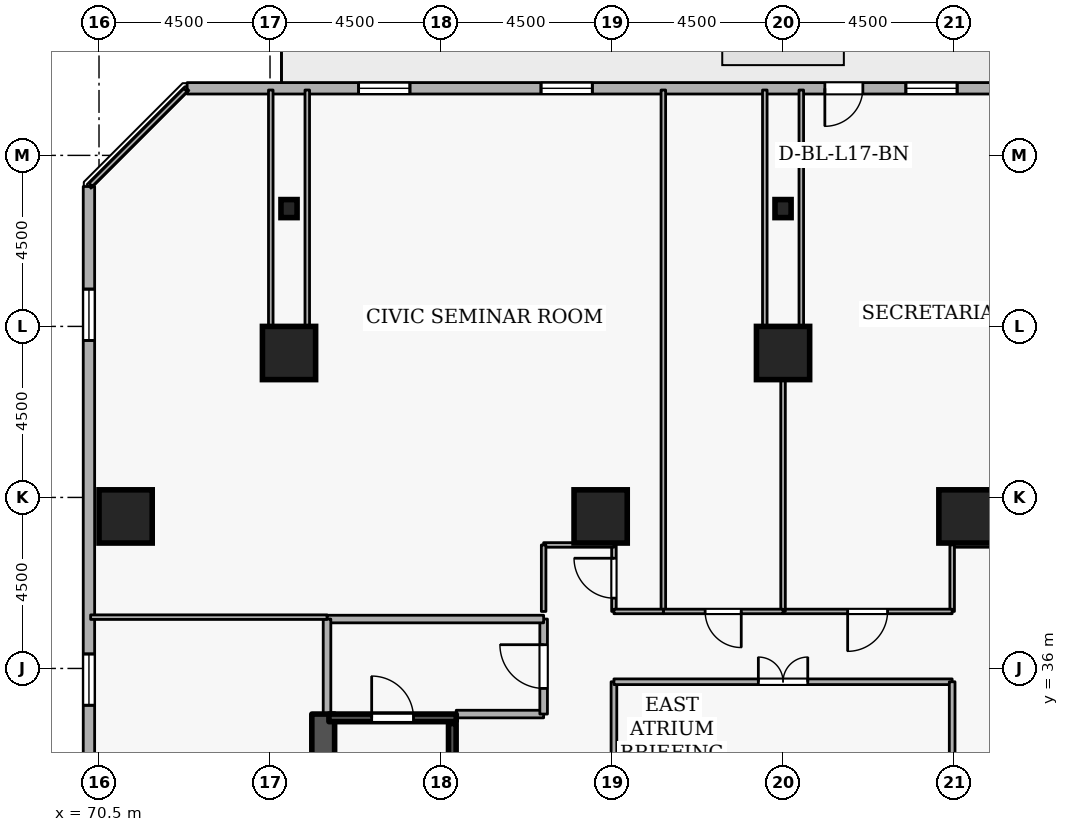
"""IFC4 building model, lengths in metres.
Left out: names, types, materials, properties, quantities, classifications, styles, units other than length and angle.
Written with IfcOpenShell. Run it as: python <this file> out.ifc"""

import sys

from ifc_helpers import new_model, si_unit, direction, frame, frame_2d, origin, origin_2d, place, context, subcontext, project, spatial, rectangle, i_section, extrude, element, fill, save


model = new_model("IFC4")
c1 = context("Model", 3, precision=1e-05, world=origin(), true_north=direction((0.0, 1.0)))
c2 = subcontext(c1, "Body", "Model", "MODEL_VIEW")
j1 = project(units=[si_unit("LENGTHUNIT", "METRE"), si_unit("PLANEANGLEUNIT", "RADIAN")], contexts=[c1])
p1 = place(None, origin())
s1 = spatial("IfcSite", under=j1, at=p1, CompositionType="ELEMENT")
p2 = place(p1, origin())
s2 = spatial("IfcBuilding", under=s1, at=p2, CompositionType="ELEMENT")
p3 = place(p2, frame((0.0, 0.0, 68.1)))
s3 = spatial("IfcBuildingStorey", under=s2, at=p3, CompositionType="ELEMENT", Elevation=68.1)
p4 = place(p3, frame((76.4, 19.2, 0.0), z_axis=(0.0, 0.0, 1.0), x_axis=(0.0, 1.0, 0.0)))
e1 = element("IfcWall", 1, at=p4, inside=s3, PredefinedType="SHEAR", context=c2, shape_type="SweptSolid", body=[
    extrude(rectangle(XDim=15.6, YDim=0.6, at=frame_2d((7.8, 0.0))), origin(), (0.0, 0.0, 1.0), 3.6),
])
for number, where, z_axis, x_axis in (
    (2, (88.5, 44.3, 0.0), (0.0, 0.0, 1.0), (1.0, 0.0, 0.0)),
    (3, (75.5, 44.3, 0.0), (0.0, 0.0, 1.0), (1.0, 0.0, 0.0)),
    (4, (71.2, 40.0, 0.0), (0.0, 0.0, 1.0), (1.0, 0.0, 0.0)),
    (5, (93.3, 40.0, 0.0), (0.0, 0.0, 1.0), (1.0, 0.0, 0.0)),
    (6, (83.7, 40.0, 0.0), (0.0, 0.0, 1.0), (1.0, 0.0, 0.0)),
):
    element("IfcColumn", number, at=place(p3, frame(where, z_axis=z_axis, x_axis=x_axis)), inside=s3, PredefinedType="COLUMN", context=c2, shape_type="SweptSolid", body=[
        extrude(rectangle(XDim=1.4, YDim=1.4, at=origin_2d()), origin(), (0.0, 0.0, 1.0), 3.6),
    ])
for number, where, z_axis, x_axis in (
    (7, (88.5, 48.1, 0.0), (0.0, 0.0, 1.0), (1.0, 0.0, 0.0)),
    (8, (75.5, 48.1, 0.0), (0.0, 0.0, 1.0), (1.0, 0.0, 0.0)),
):
    element("IfcColumn", number, at=place(p3, frame(where, z_axis=z_axis, x_axis=x_axis)), inside=s3, PredefinedType="COLUMN", context=c2, shape_type="SweptSolid", body=[
        extrude(i_section(OverallWidth=0.424, OverallDepth=0.475, WebThickness=0.048, FlangeThickness=0.077, FilletRadius=0.015, at=origin_2d()), origin(), (0.0, 0.0, 1.0), 3.6),
    ])
p5 = place(p3, frame((110.181, 51.265, 0.0), z_axis=(0.0, 0.0, 1.0), x_axis=(-1.0, 0.0, 0.0)))
e9 = element("IfcWall", 9, at=p5, inside=s3, PredefinedType="STANDARD", context=c2, shape_type="SweptSolid", body=[
    extrude(rectangle(XDim=37.362, YDim=0.3, at=frame_2d((18.681, 0.0))), origin(), (0.0, 0.0, 1.0), 2.66),
])
p6 = place(p5, frame((19.581, 0.0, 0.0)))
e10 = element("IfcOpeningElement", 10, at=p6, cuts=e9, PredefinedType="OPENING", context=c2, shape_type="SweptSolid", body=[
    extrude(rectangle(XDim=1.0, YDim=2.08, at=frame_2d((0.5, 1.04))), frame((0.0, 0.16, 0.0), z_axis=(0.0, -1.0, 0.0), x_axis=(1.0, 0.0, 0.0)), (0.0, 0.0, 1.0), 0.32),
])
p7 = place(p5, frame((2.7, 0.0, 0.72)))
e11 = element("IfcOpeningElement", 11, at=p7, cuts=e9, PredefinedType="OPENING", context=c2, shape_type="SweptSolid", body=[
    extrude(rectangle(XDim=1.35, YDim=1.05, at=frame_2d((0.675, 0.525))), frame((0.0, 0.16, 0.0), z_axis=(0.0, -1.0, 0.0), x_axis=(1.0, 0.0, 0.0)), (0.0, 0.0, 1.0), 0.32),
])
p8 = place(p5, frame((12.3, 0.0, 0.72)))
e12 = element("IfcOpeningElement", 12, at=p8, cuts=e9, PredefinedType="OPENING", context=c2, shape_type="SweptSolid", body=[
    extrude(rectangle(XDim=1.35, YDim=1.05, at=frame_2d((0.675, 0.525))), frame((0.0, 0.16, 0.0), z_axis=(0.0, -1.0, 0.0), x_axis=(1.0, 0.0, 0.0)), (0.0, 0.0, 1.0), 0.32),
])
p9 = place(p5, frame((17.1, 0.0, 0.72)))
e13 = element("IfcOpeningElement", 13, at=p9, cuts=e9, PredefinedType="OPENING", context=c2, shape_type="SweptSolid", body=[
    extrude(rectangle(XDim=1.35, YDim=1.05, at=frame_2d((0.675, 0.525))), frame((0.0, 0.16, 0.0), z_axis=(0.0, -1.0, 0.0), x_axis=(1.0, 0.0, 0.0)), (0.0, 0.0, 1.0), 0.32),
])
p10 = place(p5, frame((26.7, 0.0, 0.72)))
e14 = element("IfcOpeningElement", 14, at=p10, cuts=e9, PredefinedType="OPENING", context=c2, shape_type="SweptSolid", body=[
    extrude(rectangle(XDim=1.35, YDim=1.05, at=frame_2d((0.675, 0.525))), frame((0.0, 0.16, 0.0), z_axis=(0.0, -1.0, 0.0), x_axis=(1.0, 0.0, 0.0)), (0.0, 0.0, 1.0), 0.32),
])
p11 = place(p5, frame((31.5, 0.0, 0.72)))
e15 = element("IfcOpeningElement", 15, at=p11, cuts=e9, PredefinedType="OPENING", context=c2, shape_type="SweptSolid", body=[
    extrude(rectangle(XDim=1.35, YDim=1.05, at=frame_2d((0.675, 0.525))), frame((0.0, 0.16, 0.0), z_axis=(0.0, -1.0, 0.0), x_axis=(1.0, 0.0, 0.0)), (0.0, 0.0, 1.0), 0.32),
])
p12 = place(p3, frame((70.235, 48.681, 0.0), z_axis=(0.0, 0.0, 1.0), x_axis=(0.0, -1.0, 0.0)))
e16 = element("IfcWall", 16, at=p12, inside=s3, PredefinedType="STANDARD", context=c2, shape_type="SweptSolid", body=[
    extrude(rectangle(XDim=37.362, YDim=0.3, at=frame_2d((18.681, 0.0))), origin(), (0.0, 0.0, 1.0), 2.66),
])
p13 = place(p12, frame((2.7, 0.0, 0.72)))
e17 = element("IfcOpeningElement", 17, at=p13, cuts=e16, PredefinedType="OPENING", context=c2, shape_type="SweptSolid", body=[
    extrude(rectangle(XDim=1.35, YDim=1.05, at=frame_2d((0.675, 0.525))), frame((0.0, 0.16, 0.0), z_axis=(0.0, -1.0, 0.0), x_axis=(1.0, 0.0, 0.0)), (0.0, 0.0, 1.0), 0.32),
])
p14 = place(p12, frame((12.3, 0.0, 0.72)))
e18 = element("IfcOpeningElement", 18, at=p14, cuts=e16, PredefinedType="OPENING", context=c2, shape_type="SweptSolid", body=[
    extrude(rectangle(XDim=1.35, YDim=1.05, at=frame_2d((0.675, 0.525))), frame((0.0, 0.16, 0.0), z_axis=(0.0, -1.0, 0.0), x_axis=(1.0, 0.0, 0.0)), (0.0, 0.0, 1.0), 0.32),
])
p15 = place(p12, frame((26.7, 0.0, 0.72)))
e19 = element("IfcOpeningElement", 19, at=p15, cuts=e16, PredefinedType="OPENING", context=c2, shape_type="SweptSolid", body=[
    extrude(rectangle(XDim=1.35, YDim=1.05, at=frame_2d((0.675, 0.525))), frame((0.0, 0.16, 0.0), z_axis=(0.0, -1.0, 0.0), x_axis=(1.0, 0.0, 0.0)), (0.0, 0.0, 1.0), 0.32),
])
p16 = place(p12, frame((31.5, 0.0, 0.72)))
e20 = element("IfcOpeningElement", 20, at=p16, cuts=e16, PredefinedType="OPENING", context=c2, shape_type="SweptSolid", body=[
    extrude(rectangle(XDim=1.35, YDim=1.05, at=frame_2d((0.675, 0.525))), frame((0.0, 0.16, 0.0), z_axis=(0.0, -1.0, 0.0), x_axis=(1.0, 0.0, 0.0)), (0.0, 0.0, 1.0), 0.32),
])
p17 = place(p3, frame((76.55, 34.7, 0.0), z_axis=(0.0, 0.0, 1.0), x_axis=(1.0, 0.0, 0.0)))
e21 = element("IfcWall", 21, at=p17, inside=s3, PredefinedType="SHEAR", context=c2, shape_type="SweptSolid", body=[
    extrude(rectangle(XDim=3.35, YDim=0.2, at=frame_2d((1.675, 0.0))), origin(), (0.0, 0.0, 1.0), 3.6),
])
p18 = place(p17, frame((1.125, 0.0, 0.0)))
e22 = element("IfcOpeningElement", 22, at=p18, cuts=e21, PredefinedType="OPENING", context=c2, shape_type="SweptSolid", body=[
    extrude(rectangle(XDim=1.1, YDim=2.1, at=frame_2d((0.55, 1.05))), frame((0.0, 0.11, 0.0), z_axis=(0.0, -1.0, 0.0), x_axis=(1.0, 0.0, 0.0)), (0.0, 0.0, 1.0), 0.22),
])
p19 = place(p3, frame((79.797, 27.45, 0.0), z_axis=(0.0, 0.0, 1.0), x_axis=(0.0, 1.0, 0.0)))
e23 = element("IfcWall", 23, at=p19, inside=s3, PredefinedType="SHEAR", context=c2, shape_type="SweptSolid", body=[
    extrude(rectangle(XDim=7.1, YDim=0.2, at=frame_2d((3.55, 0.0))), origin(), (0.0, 0.0, 1.0), 3.6),
])
p20 = place(p3, frame((79.9, 34.8, 0.0), z_axis=(0.0, 0.0, 1.0), x_axis=(1.0, 0.0, 0.0)))
e24 = element("IfcWall", 24, at=p20, inside=s3, PredefinedType="STANDARD", context=c2, shape_type="SweptSolid", body=[
    extrude(rectangle(XDim=2.3, YDim=0.2, at=frame_2d((1.15, 0.0))), origin(), (0.0, 0.0, 1.0), 2.465),
])
p21 = place(p3, frame((82.2, 34.8, 0.0), z_axis=(0.0, 0.0, 1.0), x_axis=(0.0, 1.0, 0.0)))
e25 = element("IfcWall", 25, at=p21, inside=s3, PredefinedType="STANDARD", context=c2, shape_type="SweptSolid", body=[
    extrude(rectangle(XDim=2.5, YDim=0.2, at=frame_2d((1.25, 0.0))), origin(), (0.0, 0.0, 1.0), 3.26),
])
p22 = place(p21, frame((0.675, 0.0, 0.0)))
e26 = element("IfcOpeningElement", 26, at=p22, cuts=e25, PredefinedType="OPENING", context=c2, shape_type="SweptSolid", body=[
    extrude(rectangle(XDim=1.15, YDim=2.1, at=frame_2d((0.575, 1.05))), frame((0.0, 0.11, 0.0), z_axis=(0.0, -1.0, 0.0), x_axis=(1.0, 0.0, 0.0)), (0.0, 0.0, 1.0), 0.22),
])
p23 = place(p3, frame((82.2, 37.3, 0.0), z_axis=(0.0, 0.0, 1.0), x_axis=(-1.0, 0.0, 0.0)))
e27 = element("IfcWall", 27, at=p23, inside=s3, PredefinedType="STANDARD", context=c2, shape_type="SweptSolid", body=[
    extrude(rectangle(XDim=5.7, YDim=0.2, at=frame_2d((2.85, 0.0))), origin(), (0.0, 0.0, 1.0), 3.26),
])
p24 = place(p3, frame((76.5, 37.3, 0.0), z_axis=(0.0, 0.0, 1.0), x_axis=(0.0, -1.0, 0.0)))
e28 = element("IfcWall", 28, at=p24, inside=s3, PredefinedType="STANDARD", context=c2, shape_type="SweptSolid", body=[
    extrude(rectangle(XDim=2.5, YDim=0.2, at=frame_2d((1.25, 0.0))), origin(), (0.0, 0.0, 1.0), 3.26),
])
p25 = place(p3, frame((94.8, 39.25, 0.0), z_axis=(0.0, 0.0, 1.0), x_axis=(-1.0, 0.0, 0.0)))
e29 = element("IfcWall", 29, at=p25, inside=s3, PredefinedType="PARTITIONING", context=c2, shape_type="SweptSolid", body=[
    extrude(rectangle(XDim=1.85, YDim=0.12, at=frame_2d((0.925, 0.0))), origin(), (0.0, 0.0, 1.0), 3.26),
])
p26 = place(p3, frame((92.95, 39.25, 0.0), z_axis=(0.0, 0.0, 1.0), x_axis=(0.0, -1.0, 0.0)))
e30 = element("IfcWall", 30, at=p26, inside=s3, PredefinedType="PARTITIONING", context=c2, shape_type="SweptSolid", body=[
    extrude(rectangle(XDim=1.75, YDim=0.12, at=frame_2d((0.875, 0.0))), origin(), (0.0, 0.0, 1.0), 3.26),
])
p27 = place(p3, frame((92.95, 37.5, 0.0), z_axis=(0.0, 0.0, 1.0), x_axis=(-1.0, 0.0, 0.0)))
e31 = element("IfcWall", 31, at=p27, inside=s3, PredefinedType="PARTITIONING", context=c2, shape_type="SweptSolid", body=[
    extrude(rectangle(XDim=4.45, YDim=0.12, at=frame_2d((2.225, 0.0))), origin(), (0.0, 0.0, 1.0), 3.26),
])
p28 = place(p27, frame((1.7, 0.0, 0.0)))
e32 = element("IfcOpeningElement", 32, at=p28, cuts=e31, PredefinedType="OPENING", context=c2, shape_type="SweptSolid", body=[
    extrude(rectangle(XDim=1.05, YDim=2.1, at=frame_2d((0.525, 1.05))), frame((0.0, 0.07, 0.0), z_axis=(0.0, -1.0, 0.0), x_axis=(1.0, 0.0, 0.0)), (0.0, 0.0, 1.0), 0.14),
])
p29 = place(p3, frame((88.5, 37.5, 0.0), z_axis=(0.0, 0.0, 1.0), x_axis=(0.0, 1.0, 0.0)))
e33 = element("IfcWall", 33, at=p29, inside=s3, PredefinedType="PARTITIONING", context=c2, shape_type="SweptSolid", body=[
    extrude(rectangle(XDim=6.8, YDim=0.12, at=frame_2d((3.4, 0.0))), origin(), (0.0, 0.0, 1.0), 2.798),
])
p30 = place(p3, frame((88.98, 44.3, 0.0), z_axis=(0.0, 0.0, 1.0), x_axis=(0.0, 1.0, 0.0)))
e34 = element("IfcWall", 34, at=p30, inside=s3, PredefinedType="PARTITIONING", context=c2, shape_type="SweptSolid", body=[
    extrude(rectangle(XDim=6.92, YDim=0.12, at=frame_2d((3.46, 0.0))), origin(), (0.0, 0.0, 1.0), 3.26),
])
p31 = place(p3, frame((85.35, 37.5, 0.0), z_axis=(0.0, 0.0, 1.0), x_axis=(0.0, 1.0, 0.0)))
e35 = element("IfcWall", 35, at=p31, inside=s3, PredefinedType="PARTITIONING", context=c2, shape_type="SweptSolid", body=[
    extrude(rectangle(XDim=13.72, YDim=0.12, at=frame_2d((6.86, 0.0))), origin(), (0.0, 0.0, 1.0), 3.26),
])
p32 = place(p3, frame((88.02, 51.22, 0.0), z_axis=(0.0, 0.0, 1.0), x_axis=(0.0, -1.0, 0.0)))
e36 = element("IfcWall", 36, at=p32, inside=s3, PredefinedType="PARTITIONING", context=c2, shape_type="SweptSolid", body=[
    extrude(rectangle(XDim=6.92, YDim=0.12, at=frame_2d((3.46, 0.0))), origin(), (0.0, 0.0, 1.0), 3.26),
])
p33 = place(p3, frame((88.5, 37.5, 0.0), z_axis=(0.0, 0.0, 1.0), x_axis=(-1.0, 0.0, 0.0)))
e37 = element("IfcWall", 37, at=p33, inside=s3, PredefinedType="PARTITIONING", context=c2, shape_type="SweptSolid", body=[
    extrude(rectangle(XDim=3.15, YDim=0.12, at=frame_2d((1.575, 0.0))), origin(), (0.0, 0.0, 1.0), 3.26),
])
p34 = place(p33, frame((1.1, 0.0, 0.0)))
e38 = element("IfcOpeningElement", 38, at=p34, cuts=e37, PredefinedType="OPENING", context=c2, shape_type="SweptSolid", body=[
    extrude(rectangle(XDim=0.95, YDim=2.1, at=frame_2d((0.475, 1.05))), frame((0.0, 0.07, 0.0), z_axis=(0.0, -1.0, 0.0), x_axis=(1.0, 0.0, 0.0)), (0.0, 0.0, 1.0), 0.14),
])
p35 = place(p3, frame((84.05, 37.5, 0.0), z_axis=(0.0, 0.0, 1.0), x_axis=(0.0, 1.0, 0.0)))
e39 = element("IfcWall", 39, at=p35, inside=s3, PredefinedType="PARTITIONING", context=c2, shape_type="SweptSolid", body=[
    extrude(rectangle(XDim=1.75, YDim=0.12, at=frame_2d((0.875, 0.0))), origin(), (0.0, 0.0, 1.0), 3.26),
])
p36 = place(p35, frame((0.35, 0.0, 0.0)))
e40 = element("IfcOpeningElement", 40, at=p36, cuts=e39, PredefinedType="OPENING", context=c2, shape_type="SweptSolid", body=[
    extrude(rectangle(XDim=1.05, YDim=2.1, at=frame_2d((0.525, 1.05))), frame((0.0, 0.07, 0.0), z_axis=(0.0, -1.0, 0.0), x_axis=(1.0, 0.0, 0.0)), (0.0, 0.0, 1.0), 0.14),
])
p37 = place(p3, frame((84.05, 39.25, 0.0), z_axis=(0.0, 0.0, 1.0), x_axis=(-1.0, 0.0, 0.0)))
e41 = element("IfcWall", 41, at=p37, inside=s3, PredefinedType="PARTITIONING", context=c2, shape_type="SweptSolid", body=[
    extrude(rectangle(XDim=1.85, YDim=0.12, at=frame_2d((0.925, 0.0))), origin(), (0.0, 0.0, 1.0), 3.26),
])
p38 = place(p3, frame((82.2, 39.25, 0.0), z_axis=(0.0, 0.0, 1.0), x_axis=(0.0, -1.0, 0.0)))
e42 = element("IfcWall", 42, at=p38, inside=s3, PredefinedType="PARTITIONING", context=c2, shape_type="SweptSolid", body=[
    extrude(rectangle(XDim=1.75, YDim=0.12, at=frame_2d((0.875, 0.0))), origin(), (0.0, 0.0, 1.0), 3.26),
])
p39 = place(p3, frame((76.5, 37.35, 0.0), z_axis=(0.0, 0.0, 1.0), x_axis=(-1.0, 0.0, 0.0)))
e43 = element("IfcWall", 43, at=p39, inside=s3, PredefinedType="PARTITIONING", context=c2, shape_type="SweptSolid", body=[
    extrude(rectangle(XDim=6.22, YDim=0.12, at=frame_2d((3.11, 0.0))), origin(), (0.0, 0.0, 1.0), 3.26),
])
p40 = place(p3, frame((70.28, 48.725, 0.0), z_axis=(0.0, 0.0, 1.0), x_axis=(0.707106781187, 0.707106781187, 0.0)))
e44 = element("IfcWall", 44, at=p40, inside=s3, PredefinedType="PARTITIONING", context=c2, shape_type="SweptSolid", body=[
    extrude(rectangle(XDim=3.528, YDim=0.12, at=frame_2d((1.764, 0.0))), origin(), (0.0, 0.0, 1.0), 3.26),
])
p41 = place(p3, frame((75.02, 51.22, 0.0), z_axis=(0.0, 0.0, 1.0), x_axis=(0.0, -1.0, 0.0)))
e45 = element("IfcWall", 45, at=p41, inside=s3, PredefinedType="PARTITIONING", context=c2, shape_type="SweptSolid", body=[
    extrude(rectangle(XDim=6.92, YDim=0.12, at=frame_2d((3.46, 0.0))), origin(), (0.0, 0.0, 1.0), 2.815),
])
p42 = place(p3, frame((75.98, 44.3, 0.0), z_axis=(0.0, 0.0, 1.0), x_axis=(0.0, 1.0, 0.0)))
e46 = element("IfcWall", 46, at=p42, inside=s3, PredefinedType="PARTITIONING", context=c2, shape_type="SweptSolid", body=[
    extrude(rectangle(XDim=6.92, YDim=0.12, at=frame_2d((3.46, 0.0))), origin(), (0.0, 0.0, 1.0), 3.26),
])
p43 = place(p3, frame((85.35, 37.5, 0.0), z_axis=(0.0, 0.0, 1.0), x_axis=(-1.0, 0.0, 0.0)))
e47 = element("IfcWall", 47, at=p43, inside=s3, PredefinedType="PARTITIONING", context=c2, shape_type="SweptSolid", body=[
    extrude(rectangle(XDim=1.3, YDim=0.12, at=frame_2d((0.65, 0.0))), origin(), (0.0, 0.0, 1.0), 3.26),
])
p44 = place(p3, frame((84.05, 32.2, 0.0), z_axis=(0.0, 0.0, 1.0), x_axis=(0.0, 1.0, 0.0)))
e48 = element("IfcWall", 48, at=p44, inside=s3, PredefinedType="PARTITIONING", context=c2, shape_type="SweptSolid", body=[
    extrude(rectangle(XDim=3.45, YDim=0.15, at=frame_2d((1.725, 0.0))), origin(), (0.0, 0.0, 1.0), 3.26),
])
p45 = place(p3, frame((84.05, 35.65, 0.0), z_axis=(0.0, 0.0, 1.0), x_axis=(1.0, 0.0, 0.0)))
e49 = element("IfcWall", 49, at=p45, inside=s3, PredefinedType="PARTITIONING", context=c2, shape_type="SweptSolid", body=[
    extrude(rectangle(XDim=8.9, YDim=0.15, at=frame_2d((4.45, 0.0))), origin(), (0.0, 0.0, 1.0), 3.26),
])
p46 = place(p45, frame((3.8, 0.0, 0.0)))
e50 = element("IfcOpeningElement", 50, at=p46, cuts=e49, PredefinedType="OPENING", context=c2, shape_type="SweptSolid", body=[
    extrude(rectangle(XDim=1.3, YDim=2.12, at=frame_2d((0.65, 1.06))), frame((0.0, 0.085, 0.0), z_axis=(0.0, -1.0, 0.0), x_axis=(1.0, 0.0, 0.0)), (0.0, 0.0, 1.0), 0.17),
])
p47 = place(p3, frame((92.95, 35.65, 0.0), z_axis=(0.0, 0.0, 1.0), x_axis=(0.0, -1.0, 0.0)))
e51 = element("IfcWall", 51, at=p47, inside=s3, PredefinedType="PARTITIONING", context=c2, shape_type="SweptSolid", body=[
    extrude(rectangle(XDim=3.45, YDim=0.15, at=frame_2d((1.725, 0.0))), origin(), (0.0, 0.0, 1.0), 3.26),
])
p48 = place(p6, origin())
e52 = element("IfcDoor", 52, at=p48, inside=s3, OperationType="SINGLE_SWING_RIGHT", PredefinedType="DOOR", context=c2, shape_type="SweptSolid", body=[
    extrude(rectangle(XDim=1.0, YDim=2.08, at=frame_2d((0.5, 1.04))), frame((0.0, 0.025, 0.0), z_axis=(0.0, -1.0, 0.0), x_axis=(1.0, 0.0, 0.0)), (0.0, 0.0, 1.0), 0.05),
])
fill(e10, e52)
p49 = place(p9, origin())
e53 = element("IfcWindow", 53, at=p49, inside=s3, PartitioningType="SINGLE_PANEL", PredefinedType="WINDOW", context=c2, shape_type="SweptSolid", body=[
    extrude(rectangle(XDim=1.35, YDim=1.05, at=frame_2d((0.675, 0.525))), frame((0.0, 0.03, 0.0), z_axis=(0.0, -1.0, 0.0), x_axis=(1.0, 0.0, 0.0)), (0.0, 0.0, 1.0), 0.06),
])
fill(e13, e53)
p50 = place(p10, origin())
e54 = element("IfcWindow", 54, at=p50, inside=s3, PartitioningType="SINGLE_PANEL", PredefinedType="WINDOW", context=c2, shape_type="SweptSolid", body=[
    extrude(rectangle(XDim=1.35, YDim=1.05, at=frame_2d((0.675, 0.525))), frame((0.0, 0.03, 0.0), z_axis=(0.0, -1.0, 0.0), x_axis=(1.0, 0.0, 0.0)), (0.0, 0.0, 1.0), 0.06),
])
fill(e14, e54)
p51 = place(p11, origin())
e55 = element("IfcWindow", 55, at=p51, inside=s3, PartitioningType="SINGLE_PANEL", PredefinedType="WINDOW", context=c2, shape_type="SweptSolid", body=[
    extrude(rectangle(XDim=1.35, YDim=1.05, at=frame_2d((0.675, 0.525))), frame((0.0, 0.03, 0.0), z_axis=(0.0, -1.0, 0.0), x_axis=(1.0, 0.0, 0.0)), (0.0, 0.0, 1.0), 0.06),
])
fill(e15, e55)
p52 = place(p13, origin())
e56 = element("IfcWindow", 56, at=p52, inside=s3, PartitioningType="SINGLE_PANEL", PredefinedType="WINDOW", context=c2, shape_type="SweptSolid", body=[
    extrude(rectangle(XDim=1.35, YDim=1.05, at=frame_2d((0.675, 0.525))), frame((0.0, 0.03, 0.0), z_axis=(0.0, -1.0, 0.0), x_axis=(1.0, 0.0, 0.0)), (0.0, 0.0, 1.0), 0.06),
])
fill(e17, e56)
p53 = place(p14, origin())
e57 = element("IfcWindow", 57, at=p53, inside=s3, PartitioningType="SINGLE_PANEL", PredefinedType="WINDOW", context=c2, shape_type="SweptSolid", body=[
    extrude(rectangle(XDim=1.35, YDim=1.05, at=frame_2d((0.675, 0.525))), frame((0.0, 0.03, 0.0), z_axis=(0.0, -1.0, 0.0), x_axis=(1.0, 0.0, 0.0)), (0.0, 0.0, 1.0), 0.06),
])
fill(e18, e57)
p54 = place(p18, origin())
e58 = element("IfcDoor", 58, at=p54, inside=s3, OperationType="SINGLE_SWING_LEFT", PredefinedType="DOOR", context=c2, shape_type="SweptSolid", body=[
    extrude(rectangle(XDim=1.1, YDim=2.1, at=frame_2d((0.55, 1.05))), frame((0.0, 0.025, 0.0), z_axis=(0.0, -1.0, 0.0), x_axis=(1.0, 0.0, 0.0)), (0.0, 0.0, 1.0), 0.05),
])
fill(e22, e58)
p55 = place(p22, origin())
e59 = element("IfcDoor", 59, at=p55, inside=s3, OperationType="SINGLE_SWING_RIGHT", PredefinedType="DOOR", context=c2, shape_type="SweptSolid", body=[
    extrude(rectangle(XDim=1.15, YDim=2.1, at=frame_2d((0.575, 1.05))), frame((0.0, 0.025, 0.0), z_axis=(0.0, -1.0, 0.0), x_axis=(1.0, 0.0, 0.0)), (0.0, 0.0, 1.0), 0.05),
])
fill(e26, e59)
p56 = place(p28, origin())
e60 = element("IfcDoor", 60, at=p56, inside=s3, OperationType="SINGLE_SWING_RIGHT", PredefinedType="DOOR", context=c2, shape_type="SweptSolid", body=[
    extrude(rectangle(XDim=1.05, YDim=2.1, at=frame_2d((0.525, 1.05))), frame((0.0, 0.025, 0.0), z_axis=(0.0, -1.0, 0.0), x_axis=(1.0, 0.0, 0.0)), (0.0, 0.0, 1.0), 0.05),
])
fill(e32, e60)
p57 = place(p34, origin())
e61 = element("IfcDoor", 61, at=p57, inside=s3, OperationType="SINGLE_SWING_LEFT", PredefinedType="DOOR", context=c2, shape_type="SweptSolid", body=[
    extrude(rectangle(XDim=0.95, YDim=2.1, at=frame_2d((0.475, 1.05))), frame((0.0, 0.025, 0.0), z_axis=(0.0, -1.0, 0.0), x_axis=(1.0, 0.0, 0.0)), (0.0, 0.0, 1.0), 0.05),
])
fill(e38, e61)
p58 = place(p36, origin())
e62 = element("IfcDoor", 62, at=p58, inside=s3, OperationType="SINGLE_SWING_RIGHT", PredefinedType="DOOR", context=c2, shape_type="SweptSolid", body=[
    extrude(rectangle(XDim=1.05, YDim=2.1, at=frame_2d((0.525, 1.05))), frame((0.0, 0.025, 0.0), z_axis=(0.0, -1.0, 0.0), x_axis=(1.0, 0.0, 0.0)), (0.0, 0.0, 1.0), 0.05),
])
fill(e40, e62)
p59 = place(p46, origin())
e63 = element("IfcDoor", 63, at=p59, inside=s3, OperationType="DOUBLE_DOOR_SINGLE_SWING", PredefinedType="DOOR", context=c2, shape_type="SweptSolid", body=[
    extrude(rectangle(XDim=1.3, YDim=2.12, at=frame_2d((0.65, 1.06))), frame((0.0, 0.025, 0.0), z_axis=(0.0, -1.0, 0.0), x_axis=(1.0, 0.0, 0.0)), (0.0, 0.0, 1.0), 0.05),
])
fill(e50, e63)
save(model, sys.argv[1])
